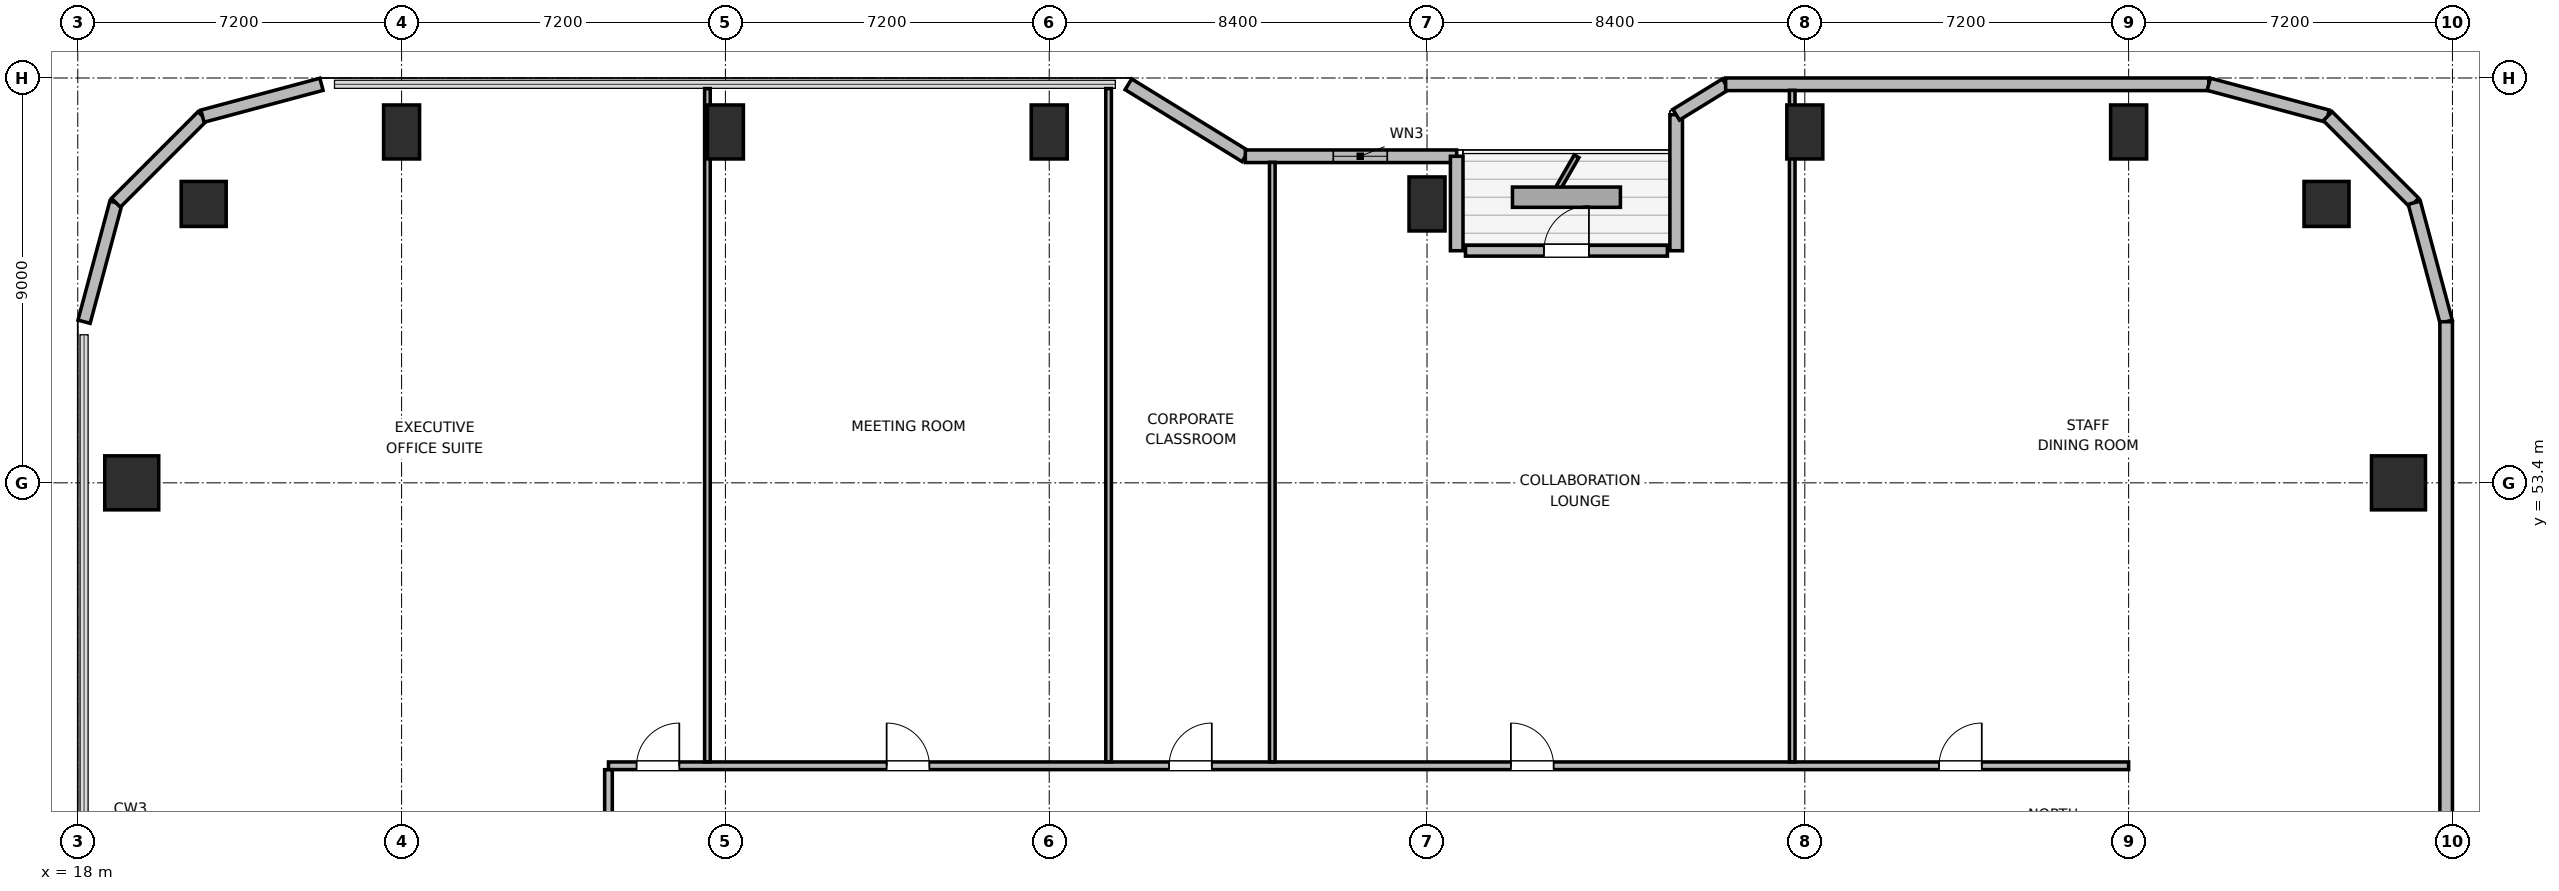
"""IFC4 building model, lengths in metres.
Left out: names, types, materials, properties, quantities, classifications, styles, units other than length and angle.
Written with IfcOpenShell. Run it as: python <this file> out.ifc"""

import sys

from ifc_helpers import new_model, si_unit, direction, frame, frame_2d, origin, origin_2d, place, context, subcontext, project, spatial, rectangle, circle, extrude, element, fill, save


model = new_model("IFC4")
c1 = context("Model", 3, precision=1e-05, world=origin(), true_north=direction((0.0, 1.0)))
c2 = subcontext(c1, "Body", "Model", "MODEL_VIEW")
j1 = project(units=[si_unit("LENGTHUNIT", "METRE"), si_unit("PLANEANGLEUNIT", "RADIAN")], contexts=[c1])
p1 = place(None, origin())
s1 = spatial("IfcSite", under=j1, at=p1, CompositionType="ELEMENT")
p2 = place(p1, origin())
s2 = spatial("IfcBuilding", under=s1, at=p2, CompositionType="ELEMENT")
p3 = place(p2, frame((0.0, 0.0, 166.2)))
s3 = spatial("IfcBuildingStorey", under=s2, at=p3, CompositionType="ELEMENT", Elevation=166.2)
for number, where, z_axis, x_axis in (
    (1, (68.0, 59.6, 0.0), (0.0, 0.0, 1.0), (1.0, 0.0, 0.0)),
    (2, (20.8, 59.6, 0.0), (0.0, 0.0, 1.0), (1.0, 0.0, 0.0)),
):
    element("IfcColumn", number, at=place(p3, frame(where, z_axis=z_axis, x_axis=x_axis)), inside=s3, PredefinedType="COLUMN", context=c2, shape_type="SweptSolid", body=[
        extrude(circle(Radius=0.5, at=origin_2d()), origin(), (0.0, 0.0, 1.0), 3.9),
    ])
for number, where, z_axis, x_axis in (
    (3, (25.2, 61.2, 0.0), (0.0, 0.0, 1.0), (1.0, 0.0, 0.0)),
    (4, (32.4, 61.2, 0.0), (0.0, 0.0, 1.0), (1.0, 0.0, 0.0)),
    (5, (39.6, 61.2, 0.0), (0.0, 0.0, 1.0), (1.0, 0.0, 0.0)),
    (6, (48.0, 59.6, 0.0), (0.0, 0.0, 1.0), (1.0, 0.0, 0.0)),
    (7, (56.4, 61.2, 0.0), (0.0, 0.0, 1.0), (1.0, 0.0, 0.0)),
    (8, (63.6, 61.2, 0.0), (0.0, 0.0, 1.0), (1.0, 0.0, 0.0)),
):
    element("IfcColumn", number, at=place(p3, frame(where, z_axis=z_axis, x_axis=x_axis)), inside=s3, PredefinedType="COLUMN", context=c2, shape_type="SweptSolid", body=[
        extrude(rectangle(XDim=0.8, YDim=1.2, at=origin_2d()), origin(), (0.0, 0.0, 1.0), 3.9),
    ])
for number, where, z_axis, x_axis in (
    (9, (19.2, 53.4, 0.0), (0.0, 0.0, 1.0), (1.0, 0.0, 0.0)),
    (10, (69.6, 53.4, 0.0), (0.0, 0.0, 1.0), (1.0, 0.0, 0.0)),
):
    element("IfcColumn", number, at=place(p3, frame(where, z_axis=z_axis, x_axis=x_axis)), inside=s3, PredefinedType="COLUMN", context=c2, shape_type="SweptSolid", body=[
        extrude(rectangle(XDim=1.2, YDim=1.2, at=origin_2d()), origin(), (0.0, 0.0, 1.0), 3.9),
    ])
p4 = place(p3, frame((18.14, 56.982, 0.0), z_axis=(0.0, 0.0, 1.0), x_axis=(0.258672222976, 0.9659651552, 0.0)))
e11 = element("IfcWall", 11, at=p4, inside=s3, PredefinedType="SOLIDWALL", context=c2, shape_type="SweptSolid", body=[
    extrude(rectangle(XDim=2.739, YDim=0.28, at=frame_2d((1.37, 0.0))), origin(), (0.0, 0.0, 1.0), 3.68),
])
p5 = place(p3, frame((18.848, 59.627, 0.0), z_axis=(0.0, 0.0, 1.0), x_axis=(0.707106781187, 0.707106781187, 0.0)))
e12 = element("IfcWall", 12, at=p5, inside=s3, PredefinedType="SOLIDWALL", context=c2, shape_type="SweptSolid", body=[
    extrude(rectangle(XDim=2.721, YDim=0.28, at=frame_2d((1.36, 0.0))), origin(), (0.0, 0.0, 1.0), 3.68),
])
p6 = place(p3, frame((20.772, 61.552, 0.0), z_axis=(0.0, 0.0, 1.0), x_axis=(0.965971118627, 0.258649952598, 0.0)))
e13 = element("IfcWall", 13, at=p6, inside=s3, PredefinedType="SOLIDWALL", context=c2, shape_type="SweptSolid", body=[
    extrude(rectangle(XDim=2.739, YDim=0.28, at=frame_2d((1.37, 0.0))), origin(), (0.0, 0.0, 1.0), 3.68),
])
p7 = place(p3, frame((41.36, 62.26, 0.0), z_axis=(0.0, 0.0, 1.0), x_axis=(0.851652825334, -0.524106349037, 0.0)))
e14 = element("IfcWall", 14, at=p7, inside=s3, PredefinedType="SOLIDWALL", context=c2, shape_type="SweptSolid", body=[
    extrude(rectangle(XDim=3.053, YDim=0.28, at=frame_2d((1.526, 0.0))), origin(), (0.0, 0.0, 1.0), 2.265),
])
p8 = place(p3, frame((43.96, 60.66, 0.0), z_axis=(0.0, 0.0, 1.0), x_axis=(1.0, 0.0, 0.0)))
e15 = element("IfcWall", 15, at=p8, inside=s3, PredefinedType="SOLIDWALL", context=c2, shape_type="SweptSolid", body=[
    extrude(rectangle(XDim=4.699, YDim=0.28, at=frame_2d((2.35, 0.0))), origin(), (0.0, 0.0, 1.0), 2.265),
])
p9 = place(p8, frame((1.955, 0.0, 0.85)))
e16 = element("IfcOpeningElement", 16, at=p9, cuts=e15, PredefinedType="OPENING", context=c2, shape_type="SweptSolid", body=[
    extrude(rectangle(XDim=1.2, YDim=1.1, at=frame_2d((0.6, 0.55))), frame((0.0, 0.15, 0.0), z_axis=(0.0, -1.0, 0.0), x_axis=(1.0, 0.0, 0.0)), (0.0, 0.0, 1.0), 0.3),
])
p10 = place(p3, frame((48.66, 60.66, 0.0), z_axis=(0.0, 0.0, 1.0), x_axis=(0.0, -1.0, 0.0)))
e17 = element("IfcWall", 17, at=p10, inside=s3, PredefinedType="SOLIDWALL", context=c2, shape_type="SweptSolid", body=[
    extrude(rectangle(XDim=2.1, YDim=0.28, at=frame_2d((1.05, 0.0))), origin(), (0.0, 0.0, 1.0), 2.265),
])
p11 = place(p3, frame((48.855, 58.56, 0.0), z_axis=(0.0, 0.0, 1.0), x_axis=(1.0, 0.0, 0.0)))
e18 = element("IfcWall", 18, at=p11, inside=s3, PredefinedType="SOLIDWALL", context=c2, shape_type="SweptSolid", body=[
    extrude(rectangle(XDim=4.49, YDim=0.24, at=frame_2d((2.245, 0.0))), origin(), (0.0, 0.0, 1.0), 3.68),
])
p12 = place(p11, frame((1.745, 0.0, 0.0)))
e19 = element("IfcOpeningElement", 19, at=p12, cuts=e18, PredefinedType="OPENING", context=c2, shape_type="SweptSolid", body=[
    extrude(rectangle(XDim=1.0, YDim=2.02, at=frame_2d((0.5, 1.01))), frame((0.0, 0.13, 0.0), z_axis=(0.0, -1.0, 0.0), x_axis=(1.0, 0.0, 0.0)), (0.0, 0.0, 1.0), 0.26),
])
p13 = place(p3, frame((53.54, 58.56, 0.0), z_axis=(0.0, 0.0, 1.0), x_axis=(0.0, 1.0, 0.0)))
e20 = element("IfcWall", 20, at=p13, inside=s3, PredefinedType="SOLIDWALL", context=c2, shape_type="SweptSolid", body=[
    extrude(rectangle(XDim=3.024, YDim=0.28, at=frame_2d((1.512, 0.0))), origin(), (0.0, 0.0, 1.0), 2.265),
])
p14 = place(p3, frame((53.54, 61.584, 0.0), z_axis=(0.0, 0.0, 1.0), x_axis=(0.851801140441, 0.523865266212, 0.0)))
e21 = element("IfcWall", 21, at=p14, inside=s3, PredefinedType="SOLIDWALL", context=c2, shape_type="SweptSolid", body=[
    extrude(rectangle(XDim=1.291, YDim=0.28, at=frame_2d((0.646, 0.0))), origin(), (0.0, 0.0, 1.0), 3.68),
])
p15 = place(p3, frame((54.64, 62.26, 0.0), z_axis=(0.0, 0.0, 1.0), x_axis=(1.0, 0.0, 0.0)))
e22 = element("IfcWall", 22, at=p15, inside=s3, PredefinedType="SOLIDWALL", context=c2, shape_type="SweptSolid", body=[
    extrude(rectangle(XDim=10.742, YDim=0.28, at=frame_2d((5.371, 0.0))), origin(), (0.0, 0.0, 1.0), 3.68),
])
p16 = place(p3, frame((65.382, 62.26, 0.0), z_axis=(0.0, 0.0, 1.0), x_axis=(0.965971118627, -0.258649952598, 0.0)))
e23 = element("IfcWall", 23, at=p16, inside=s3, PredefinedType="SOLIDWALL", context=c2, shape_type="SweptSolid", body=[
    extrude(rectangle(XDim=2.739, YDim=0.28, at=frame_2d((1.37, 0.0))), origin(), (0.0, 0.0, 1.0), 3.68),
])
p17 = place(p3, frame((68.028, 61.552, 0.0), z_axis=(0.0, 0.0, 1.0), x_axis=(0.707061915429, -0.707151644098, 0.0)))
e24 = element("IfcWall", 24, at=p17, inside=s3, PredefinedType="SOLIDWALL", context=c2, shape_type="SweptSolid", body=[
    extrude(rectangle(XDim=2.721, YDim=0.28, at=frame_2d((1.36, 0.0))), origin(), (0.0, 0.0, 1.0), 3.68),
])
p18 = place(p3, frame((69.951, 59.627, 0.0), z_axis=(0.0, 0.0, 1.0), x_axis=(0.258672222976, -0.9659651552, 0.0)))
e25 = element("IfcWall", 25, at=p18, inside=s3, PredefinedType="SOLIDWALL", context=c2, shape_type="SweptSolid", body=[
    extrude(rectangle(XDim=2.739, YDim=0.28, at=frame_2d((1.37, 0.0))), origin(), (0.0, 0.0, 1.0), 3.68),
])
p19 = place(p3, frame((70.66, 56.982, 0.0), z_axis=(0.0, 0.0, 1.0), x_axis=(0.0, -1.0, 0.0)))
e26 = element("IfcWall", 26, at=p19, inside=s3, PredefinedType="SOLIDWALL", context=c2, shape_type="SweptSolid", body=[
    extrude(rectangle(XDim=14.242, YDim=0.28, at=frame_2d((7.121, 0.0))), origin(), (0.0, 0.0, 1.0), 3.68),
])
p20 = place(p3, frame((29.8, 47.11, 0.0), z_axis=(0.0, 0.0, 1.0), x_axis=(1.0, 0.0, 0.0)))
e27 = element("IfcWall", 27, at=p20, inside=s3, PredefinedType="PARTITIONING", context=c2, shape_type="SweptSolid", body=[
    extrude(rectangle(XDim=33.8, YDim=0.17, at=frame_2d((16.9, 0.0))), origin(), (0.0, 0.0, 1.0), 3.68),
])
p21 = place(p20, frame((0.625, 0.0, 0.0)))
e28 = element("IfcOpeningElement", 28, at=p21, cuts=e27, PredefinedType="OPENING", context=c2, shape_type="SweptSolid", body=[
    extrude(rectangle(XDim=0.95, YDim=2.04, at=frame_2d((0.475, 1.02))), frame((0.0, 0.095, 0.0), z_axis=(0.0, -1.0, 0.0), x_axis=(1.0, 0.0, 0.0)), (0.0, 0.0, 1.0), 0.19),
])
p22 = place(p20, frame((6.185, 0.0, 0.0)))
e29 = element("IfcOpeningElement", 29, at=p22, cuts=e27, PredefinedType="OPENING", context=c2, shape_type="SweptSolid", body=[
    extrude(rectangle(XDim=0.95, YDim=2.04, at=frame_2d((0.475, 1.02))), frame((0.0, 0.095, 0.0), z_axis=(0.0, -1.0, 0.0), x_axis=(1.0, 0.0, 0.0)), (0.0, 0.0, 1.0), 0.19),
])
p23 = place(p20, frame((12.465, 0.0, 0.0)))
e30 = element("IfcOpeningElement", 30, at=p23, cuts=e27, PredefinedType="OPENING", context=c2, shape_type="SweptSolid", body=[
    extrude(rectangle(XDim=0.95, YDim=2.04, at=frame_2d((0.475, 1.02))), frame((0.0, 0.095, 0.0), z_axis=(0.0, -1.0, 0.0), x_axis=(1.0, 0.0, 0.0)), (0.0, 0.0, 1.0), 0.19),
])
p24 = place(p20, frame((20.065, 0.0, 0.0)))
e31 = element("IfcOpeningElement", 31, at=p24, cuts=e27, PredefinedType="OPENING", context=c2, shape_type="SweptSolid", body=[
    extrude(rectangle(XDim=0.95, YDim=2.04, at=frame_2d((0.475, 1.02))), frame((0.0, 0.095, 0.0), z_axis=(0.0, -1.0, 0.0), x_axis=(1.0, 0.0, 0.0)), (0.0, 0.0, 1.0), 0.19),
])
p25 = place(p20, frame((29.585, 0.0, 0.0)))
e32 = element("IfcOpeningElement", 32, at=p25, cuts=e27, PredefinedType="OPENING", context=c2, shape_type="SweptSolid", body=[
    extrude(rectangle(XDim=0.95, YDim=2.04, at=frame_2d((0.475, 1.02))), frame((0.0, 0.095, 0.0), z_axis=(0.0, -1.0, 0.0), x_axis=(1.0, 0.0, 0.0)), (0.0, 0.0, 1.0), 0.19),
])
p26 = place(p3, frame((29.8, 37.1, 0.0), z_axis=(0.0, 0.0, 1.0), x_axis=(0.0, 1.0, 0.0)))
e33 = element("IfcWall", 33, at=p26, inside=s3, PredefinedType="PARTITIONING", context=c2, shape_type="SweptSolid", body=[
    extrude(rectangle(XDim=9.923, YDim=0.17, at=frame_2d((4.961, 0.0))), origin(), (0.0, 0.0, 1.0), 3.68),
])
p27 = place(p26, frame((4.53, 0.0, 0.0)))
e34 = element("IfcOpeningElement", 34, at=p27, cuts=e33, PredefinedType="OPENING", context=c2, shape_type="SweptSolid", body=[
    extrude(rectangle(XDim=0.95, YDim=2.04, at=frame_2d((0.475, 1.02))), frame((0.0, 0.095, 0.0), z_axis=(0.0, -1.0, 0.0), x_axis=(1.0, 0.0, 0.0)), (0.0, 0.0, 1.0), 0.19),
])
p28 = place(p3, frame((32.0, 47.197, 0.0), z_axis=(0.0, 0.0, 1.0), x_axis=(0.0, 1.0, 0.0)))
e35 = element("IfcWall", 35, at=p28, inside=s3, PredefinedType="PARTITIONING", context=c2, shape_type="SweptSolid", body=[
    extrude(rectangle(XDim=14.968, YDim=0.125, at=frame_2d((7.484, 0.0))), origin(), (0.0, 0.0, 1.0), 3.68),
])
p29 = place(p3, frame((40.92, 47.197, 0.0), z_axis=(0.0, 0.0, 1.0), x_axis=(0.0, 1.0, 0.0)))
e36 = element("IfcWall", 36, at=p29, inside=s3, PredefinedType="PARTITIONING", context=c2, shape_type="SweptSolid", body=[
    extrude(rectangle(XDim=14.968, YDim=0.125, at=frame_2d((7.484, 0.0))), origin(), (0.0, 0.0, 1.0), 3.043),
])
p30 = place(p3, frame((44.56, 47.197, 0.0), z_axis=(0.0, 0.0, 1.0), x_axis=(0.0, 1.0, 0.0)))
e37 = element("IfcWall", 37, at=p30, inside=s3, PredefinedType="PARTITIONING", context=c2, shape_type="SweptSolid", body=[
    extrude(rectangle(XDim=13.328, YDim=0.125, at=frame_2d((6.664, 0.0))), origin(), (0.0, 0.0, 1.0), 3.043),
])
p31 = place(p3, frame((56.12, 47.197, 0.0), z_axis=(0.0, 0.0, 1.0), x_axis=(0.0, 1.0, 0.0)))
e38 = element("IfcWall", 38, at=p31, inside=s3, PredefinedType="PARTITIONING", context=c2, shape_type="SweptSolid", body=[
    extrude(rectangle(XDim=14.928, YDim=0.125, at=frame_2d((7.464, 0.0))), origin(), (0.0, 0.0, 1.0), 3.043),
])
p32 = place(p9, origin())
e39 = element("IfcWindow", 39, at=p32, inside=s3, PartitioningType="SINGLE_PANEL", PredefinedType="WINDOW", context=c2, shape_type="SweptSolid", body=[
    extrude(rectangle(XDim=1.2, YDim=1.1, at=frame_2d((0.6, 0.55))), frame((0.0, 0.03, 0.0), z_axis=(0.0, -1.0, 0.0), x_axis=(1.0, 0.0, 0.0)), (0.0, 0.0, 1.0), 0.06),
])
fill(e16, e39)
p33 = place(p12, origin())
e40 = element("IfcDoor", 40, at=p33, inside=s3, OperationType="SINGLE_SWING_RIGHT", PredefinedType="DOOR", context=c2, shape_type="SweptSolid", body=[
    extrude(rectangle(XDim=1.0, YDim=2.02, at=frame_2d((0.5, 1.01))), frame((0.0, 0.025, 0.0), z_axis=(0.0, -1.0, 0.0), x_axis=(1.0, 0.0, 0.0)), (0.0, 0.0, 1.0), 0.05),
])
fill(e19, e40)
p34 = place(p21, origin())
e41 = element("IfcDoor", 41, at=p34, inside=s3, OperationType="SINGLE_SWING_RIGHT", PredefinedType="DOOR", context=c2, shape_type="SweptSolid", body=[
    extrude(rectangle(XDim=0.95, YDim=2.04, at=frame_2d((0.475, 1.02))), frame((0.0, 0.025, 0.0), z_axis=(0.0, -1.0, 0.0), x_axis=(1.0, 0.0, 0.0)), (0.0, 0.0, 1.0), 0.05),
])
fill(e28, e41)
p35 = place(p22, origin())
e42 = element("IfcDoor", 42, at=p35, inside=s3, OperationType="SINGLE_SWING_LEFT", PredefinedType="DOOR", context=c2, shape_type="SweptSolid", body=[
    extrude(rectangle(XDim=0.95, YDim=2.04, at=frame_2d((0.475, 1.02))), frame((0.0, 0.025, 0.0), z_axis=(0.0, -1.0, 0.0), x_axis=(1.0, 0.0, 0.0)), (0.0, 0.0, 1.0), 0.05),
])
fill(e29, e42)
p36 = place(p23, origin())
e43 = element("IfcDoor", 43, at=p36, inside=s3, OperationType="SINGLE_SWING_RIGHT", PredefinedType="DOOR", context=c2, shape_type="SweptSolid", body=[
    extrude(rectangle(XDim=0.95, YDim=2.04, at=frame_2d((0.475, 1.02))), frame((0.0, 0.025, 0.0), z_axis=(0.0, -1.0, 0.0), x_axis=(1.0, 0.0, 0.0)), (0.0, 0.0, 1.0), 0.05),
])
fill(e30, e43)
p37 = place(p24, origin())
e44 = element("IfcDoor", 44, at=p37, inside=s3, OperationType="SINGLE_SWING_LEFT", PredefinedType="DOOR", context=c2, shape_type="SweptSolid", body=[
    extrude(rectangle(XDim=0.95, YDim=2.04, at=frame_2d((0.475, 1.02))), frame((0.0, 0.025, 0.0), z_axis=(0.0, -1.0, 0.0), x_axis=(1.0, 0.0, 0.0)), (0.0, 0.0, 1.0), 0.05),
])
fill(e31, e44)
p38 = place(p25, origin())
e45 = element("IfcDoor", 45, at=p38, inside=s3, OperationType="SINGLE_SWING_RIGHT", PredefinedType="DOOR", context=c2, shape_type="SweptSolid", body=[
    extrude(rectangle(XDim=0.95, YDim=2.04, at=frame_2d((0.475, 1.02))), frame((0.0, 0.025, 0.0), z_axis=(0.0, -1.0, 0.0), x_axis=(1.0, 0.0, 0.0)), (0.0, 0.0, 1.0), 0.05),
])
fill(e32, e45)
save(model, sys.argv[1])
